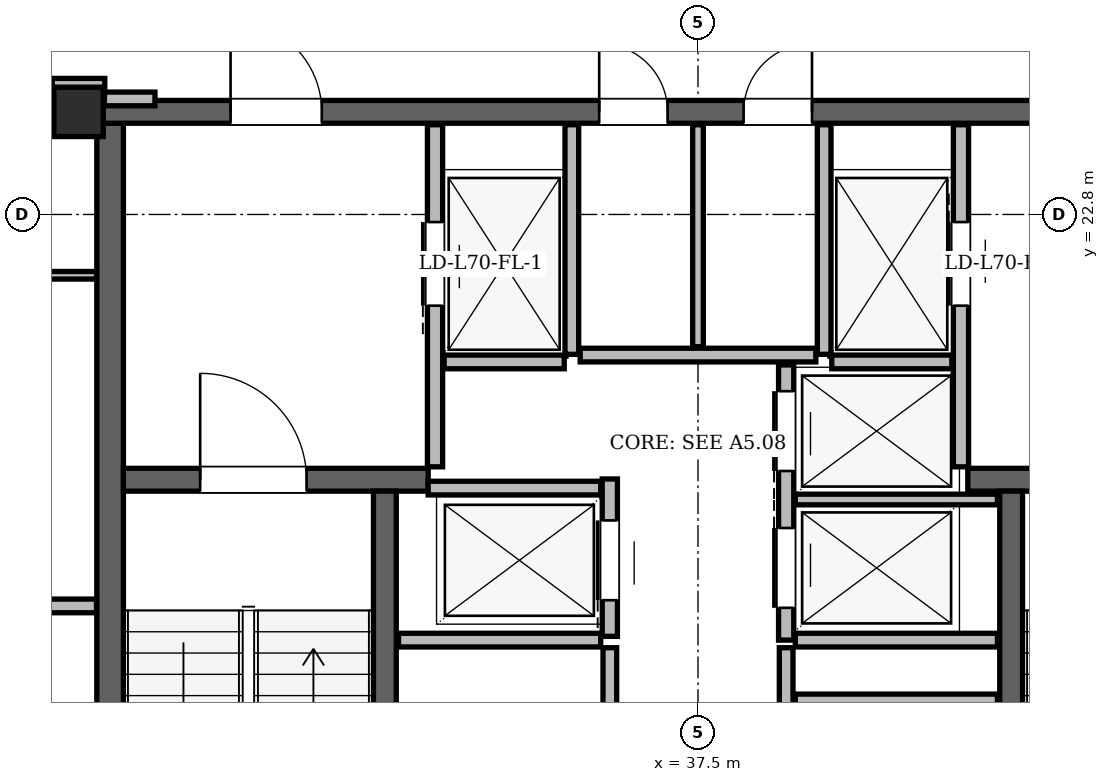
"""IFC4 building model, lengths in metres.
Left out: names, types, materials, properties, quantities, classifications, styles, units other than length and angle.
Written with IfcOpenShell. Run it as: python <this file> out.ifc"""

import sys

from ifc_helpers import new_model, si_unit, direction, frame, frame_2d, origin, origin_2d, place, context, subcontext, project, spatial, rectangle, hollow_rectangle, extrude, element, fill, save


model = new_model("IFC4")
c1 = context("Model", 3, precision=1e-05, world=origin(), true_north=direction((0.0, 1.0)))
c2 = subcontext(c1, "Body", "Model", "MODEL_VIEW")
j1 = project(units=[si_unit("LENGTHUNIT", "METRE"), si_unit("PLANEANGLEUNIT", "RADIAN")], contexts=[c1])
p1 = place(None, origin())
s1 = spatial("IfcSite", under=j1, at=p1, CompositionType="ELEMENT")
p2 = place(p1, origin())
s2 = spatial("IfcBuilding", under=s1, at=p2, CompositionType="ELEMENT")
p3 = place(p2, frame((0.0, 0.0, 265.5)))
s3 = spatial("IfcBuildingStorey", under=s2, at=p3, CompositionType="ELEMENT", Elevation=265.5)
p4 = place(p3, frame((29.35, 24.15, 0.0), z_axis=(0.0, 0.0, 1.0), x_axis=(1.0, 0.0, 0.0)))
e1 = element("IfcColumn", 1, at=p4, inside=s3, PredefinedType="COLUMN", context=c2, shape_type="SweptSolid", body=[
    extrude(hollow_rectangle(XDim=0.65, YDim=0.65, WallThickness=0.05, at=origin_2d()), origin(), (0.0, 0.0, 1.0), 3.9),
])
p5 = place(p3, frame((29.765, 11.0, 0.0), z_axis=(0.0, 0.0, 1.0), x_axis=(0.0, 1.0, 0.0)))
e2 = element("IfcWall", 2, at=p5, inside=s3, PredefinedType="SHEAR", context=c2, shape_type="SweptSolid", body=[
    extrude(rectangle(XDim=13.3, YDim=0.35, at=frame_2d((6.65, 0.0))), origin(), (0.0, 0.0, 1.0), 3.68),
])
p6 = place(p3, frame((29.65, 24.15, 0.0), z_axis=(0.0, 0.0, 1.0), x_axis=(1.0, 0.0, 0.0)))
e3 = element("IfcWall", 3, at=p6, inside=s3, PredefinedType="SHEAR", context=c2, shape_type="SweptSolid", body=[
    extrude(rectangle(XDim=15.7, YDim=0.3, at=frame_2d((7.85, 0.0))), origin(), (0.0, 0.0, 1.0), 3.68),
])
p7 = place(p6, frame((1.7, 0.0, 0.0)))
e4 = element("IfcOpeningElement", 4, at=p7, cuts=e3, PredefinedType="OPENING", context=c2, shape_type="SweptSolid", body=[
    extrude(rectangle(XDim=1.2, YDim=2.2, at=frame_2d((0.6, 1.1))), frame((0.0, 0.15, 0.0), z_axis=(0.0, -1.0, 0.0), x_axis=(1.0, 0.0, 0.0)), (0.0, 0.0, 1.0), 0.3),
])
p8 = place(p6, frame((12.8, 0.0, 0.0)))
e5 = element("IfcOpeningElement", 5, at=p8, cuts=e3, PredefinedType="OPENING", context=c2, shape_type="SweptSolid", body=[
    extrude(rectangle(XDim=1.2, YDim=2.2, at=frame_2d((0.6, 1.1))), frame((0.0, 0.15, 0.0), z_axis=(0.0, -1.0, 0.0), x_axis=(1.0, 0.0, 0.0)), (0.0, 0.0, 1.0), 0.3),
])
p9 = place(p6, frame((6.55, 0.0, 0.0)))
e6 = element("IfcOpeningElement", 6, at=p9, cuts=e3, PredefinedType="OPENING", context=c2, shape_type="SweptSolid", body=[
    extrude(rectangle(XDim=0.9, YDim=2.05, at=frame_2d((0.45, 1.025))), frame((0.0, 0.15, 0.0), z_axis=(0.0, -1.0, 0.0), x_axis=(1.0, 0.0, 0.0)), (0.0, 0.0, 1.0), 0.3),
])
p10 = place(p6, frame((8.45, 0.0, 0.0)))
e7 = element("IfcOpeningElement", 7, at=p10, cuts=e3, PredefinedType="OPENING", context=c2, shape_type="SweptSolid", body=[
    extrude(rectangle(XDim=0.9, YDim=2.05, at=frame_2d((0.45, 1.025))), frame((0.0, 0.15, 0.0), z_axis=(0.0, -1.0, 0.0), x_axis=(1.0, 0.0, 0.0)), (0.0, 0.0, 1.0), 0.3),
])
p11 = place(p3, frame((29.94, 19.31, 0.0), z_axis=(0.0, 0.0, 1.0), x_axis=(1.0, 0.0, 0.0)))
e8 = element("IfcWall", 8, at=p11, inside=s3, PredefinedType="SHEAR", context=c2, shape_type="SweptSolid", body=[
    extrude(rectangle(XDim=4.01, YDim=0.3, at=frame_2d((2.005, 0.0))), origin(), (0.0, 0.0, 1.0), 3.68),
])
p12 = place(p11, frame((1.01, 0.0, 0.0)))
e9 = element("IfcOpeningElement", 9, at=p12, cuts=e8, PredefinedType="OPENING", context=c2, shape_type="SweptSolid", body=[
    extrude(rectangle(XDim=1.4, YDim=2.2, at=frame_2d((0.7, 1.1))), frame((0.0, 0.15, 0.0), z_axis=(0.0, -1.0, 0.0), x_axis=(1.0, 0.0, 0.0)), (0.0, 0.0, 1.0), 0.3),
])
p13 = place(p3, frame((41.05, 19.31, 0.0), z_axis=(0.0, 0.0, 1.0), x_axis=(1.0, 0.0, 0.0)))
e10 = element("IfcWall", 10, at=p13, inside=s3, PredefinedType="SHEAR", context=c2, shape_type="SweptSolid", body=[
    extrude(rectangle(XDim=4.01, YDim=0.3, at=frame_2d((2.005, 0.0))), origin(), (0.0, 0.0, 1.0), 3.68),
])
p14 = place(p13, frame((1.6, 0.0, 0.0)))
e11 = element("IfcOpeningElement", 11, at=p14, cuts=e10, PredefinedType="OPENING", context=c2, shape_type="SweptSolid", body=[
    extrude(rectangle(XDim=1.4, YDim=2.2, at=frame_2d((0.7, 1.1))), frame((0.0, 0.15, 0.0), z_axis=(0.0, -1.0, 0.0), x_axis=(1.0, 0.0, 0.0)), (0.0, 0.0, 1.0), 0.3),
])
for number, where, z_axis, x_axis in (
    (12, (33.38, 11.54, 0.0), (0.0, 0.0, 1.0), (0.0, 1.0, 0.0)),
    (13, (41.62, 11.54, 0.0), (0.0, 0.0, 1.0), (0.0, 1.0, 0.0)),
):
    element("IfcWall", number, at=place(p3, frame(where, z_axis=z_axis, x_axis=x_axis)), inside=s3, PredefinedType="SHEAR", context=c2, shape_type="SweptSolid", body=[
        extrude(rectangle(XDim=7.62, YDim=0.3, at=frame_2d((3.81, 0.0))), origin(), (0.0, 0.0, 1.0), 3.68),
    ])
p15 = place(p3, frame((35.012, 43.042, 0.0), z_axis=(0.0, 0.0, 1.0), x_axis=(-0.49999932964, -0.866025790817, 0.0)))
e14 = element("IfcWall", 14, at=p15, inside=s3, PredefinedType="SOLIDWALL", context=c2, shape_type="SweptSolid", body=[
    extrude(rectangle(XDim=37.248, YDim=0.29, at=frame_2d((18.624, 0.0))), origin(), (0.0, 0.0, 1.0), 3.058),
])
p16 = place(p15, frame((3.639, 0.0, 0.0)))
e15 = element("IfcOpeningElement", 15, at=p16, cuts=e14, PredefinedType="OPENING", context=c2, shape_type="SweptSolid", body=[
    extrude(rectangle(XDim=1.5, YDim=2.2, at=frame_2d((0.75, 1.1))), frame((0.0, 0.145, 0.0), z_axis=(0.0, -1.0, 0.0), x_axis=(1.0, 0.0, 0.0)), (0.0, 0.0, 1.0), 0.29),
])
p17 = place(p15, frame((27.504, 0.0, 0.0)))
e16 = element("IfcOpeningElement", 16, at=p17, cuts=e14, PredefinedType="OPENING", context=c2, shape_type="SweptSolid", body=[
    extrude(rectangle(XDim=1.5, YDim=2.2, at=frame_2d((0.75, 1.1))), frame((0.0, 0.145, 0.0), z_axis=(0.0, -1.0, 0.0), x_axis=(1.0, 0.0, 0.0)), (0.0, 0.0, 1.0), 0.29),
])
p18 = place(p15, frame((35.135, 0.0, 0.85)))
e17 = element("IfcOpeningElement", 17, at=p18, cuts=e14, PredefinedType="OPENING", context=c2, shape_type="SweptSolid", body=[
    extrude(rectangle(XDim=1.2, YDim=1.48, at=frame_2d((0.6, 0.74))), frame((0.0, 0.145, 0.0), z_axis=(0.0, -1.0, 0.0), x_axis=(1.0, 0.0, 0.0)), (0.0, 0.0, 1.0), 0.29),
])
p19 = place(p15, frame((32.321, 0.0, 0.85)))
e18 = element("IfcOpeningElement", 18, at=p19, cuts=e14, PredefinedType="OPENING", context=c2, shape_type="SweptSolid", body=[
    extrude(rectangle(XDim=2.0, YDim=1.8, at=frame_2d((1.0, 0.9))), frame((0.0, 0.145, 0.0), z_axis=(0.0, -1.0, 0.0), x_axis=(1.0, 0.0, 0.0)), (0.0, 0.0, 1.0), 0.29),
])
p20 = place(p15, frame((12.691, 0.0, 0.85)))
e19 = element("IfcOpeningElement", 19, at=p20, cuts=e14, PredefinedType="OPENING", context=c2, shape_type="SweptSolid", body=[
    extrude(rectangle(XDim=2.0, YDim=1.8, at=frame_2d((1.0, 0.9))), frame((0.0, 0.145, 0.0), z_axis=(0.0, -1.0, 0.0), x_axis=(1.0, 0.0, 0.0)), (0.0, 0.0, 1.0), 0.29),
])
p21 = place(p15, frame((21.019, 0.0, 0.85)))
e20 = element("IfcOpeningElement", 20, at=p21, cuts=e14, PredefinedType="OPENING", context=c2, shape_type="SweptSolid", body=[
    extrude(rectangle(XDim=1.4, YDim=1.6, at=frame_2d((0.7, 0.8))), frame((0.0, 0.145, 0.0), z_axis=(0.0, -1.0, 0.0), x_axis=(1.0, 0.0, 0.0)), (0.0, 0.0, 1.0), 0.29),
])
p22 = place(p15, frame((1.529, 0.0, 0.85)))
e21 = element("IfcOpeningElement", 21, at=p22, cuts=e14, PredefinedType="OPENING", context=c2, shape_type="SweptSolid", body=[
    extrude(rectangle(XDim=1.2, YDim=1.48, at=frame_2d((0.6, 0.74))), frame((0.0, 0.145, 0.0), z_axis=(0.0, -1.0, 0.0), x_axis=(1.0, 0.0, 0.0)), (0.0, 0.0, 1.0), 0.29),
])
p23 = place(p15, frame((7.904, 0.0, 0.85)))
e22 = element("IfcOpeningElement", 22, at=p23, cuts=e14, PredefinedType="OPENING", context=c2, shape_type="SweptSolid", body=[
    extrude(rectangle(XDim=2.0, YDim=1.8, at=frame_2d((1.0, 0.9))), frame((0.0, 0.145, 0.0), z_axis=(0.0, -1.0, 0.0), x_axis=(1.0, 0.0, 0.0)), (0.0, 0.0, 1.0), 0.29),
])
p24 = place(p3, frame((34.04, 19.48, 0.0), z_axis=(0.0, 0.0, 1.0), x_axis=(0.0, 1.0, 0.0)))
e23 = element("IfcWall", 23, at=p24, inside=s3, PredefinedType="PARTITIONING", context=c2, shape_type="SweptSolid", body=[
    extrude(rectangle(XDim=4.5, YDim=0.2, at=frame_2d((2.25, 0.0))), origin(), (0.0, 0.0, 1.0), 3.68),
])
p25 = place(p24, frame((2.12, 0.0, 0.0)))
e24 = element("IfcOpeningElement", 24, at=p25, cuts=e23, PredefinedType="OPENING", context=c2, shape_type="SweptSolid", body=[
    extrude(rectangle(XDim=1.1, YDim=2.2, at=frame_2d((0.55, 1.1))), frame((0.0, 0.1, 0.0), z_axis=(0.0, -1.0, 0.0), x_axis=(1.0, 0.0, 0.0)), (0.0, 0.0, 1.0), 0.2),
])
p26 = place(p3, frame((35.84, 20.96, 0.0), z_axis=(0.0, 0.0, 1.0), x_axis=(0.0, 1.0, 0.0)))
e25 = element("IfcWall", 25, at=p26, inside=s3, PredefinedType="PARTITIONING", context=c2, shape_type="SweptSolid", body=[
    extrude(rectangle(XDim=3.02, YDim=0.18, at=frame_2d((1.51, 0.0))), origin(), (0.0, 0.0, 1.0), 3.68),
])
p27 = place(p3, frame((34.16, 20.86, 0.0), z_axis=(0.0, 0.0, 1.0), x_axis=(1.0, 0.0, 0.0)))
e26 = element("IfcWall", 26, at=p27, inside=s3, PredefinedType="PARTITIONING", context=c2, shape_type="SweptSolid", body=[
    extrude(rectangle(XDim=1.58, YDim=0.18, at=frame_2d((0.79, 0.0))), origin(), (0.0, 0.0, 1.0), 3.68),
])
p28 = place(p3, frame((40.96, 19.48, 0.0), z_axis=(0.0, 0.0, 1.0), x_axis=(0.0, 1.0, 0.0)))
e27 = element("IfcWall", 27, at=p28, inside=s3, PredefinedType="PARTITIONING", context=c2, shape_type="SweptSolid", body=[
    extrude(rectangle(XDim=4.5, YDim=0.2, at=frame_2d((2.25, 0.0))), origin(), (0.0, 0.0, 1.0), 3.68),
])
p29 = place(p28, frame((2.12, 0.0, 0.0)))
e28 = element("IfcOpeningElement", 28, at=p29, cuts=e27, PredefinedType="OPENING", context=c2, shape_type="SweptSolid", body=[
    extrude(rectangle(XDim=1.1, YDim=2.2, at=frame_2d((0.55, 1.1))), frame((0.0, 0.1, 0.0), z_axis=(0.0, -1.0, 0.0), x_axis=(1.0, 0.0, 0.0)), (0.0, 0.0, 1.0), 0.2),
])
p30 = place(p3, frame((39.16, 20.96, 0.0), z_axis=(0.0, 0.0, 1.0), x_axis=(0.0, 1.0, 0.0)))
e29 = element("IfcWall", 29, at=p30, inside=s3, PredefinedType="PARTITIONING", context=c2, shape_type="SweptSolid", body=[
    extrude(rectangle(XDim=3.02, YDim=0.18, at=frame_2d((1.51, 0.0))), origin(), (0.0, 0.0, 1.0), 3.68),
])
p31 = place(p3, frame((39.26, 20.86, 0.0), z_axis=(0.0, 0.0, 1.0), x_axis=(1.0, 0.0, 0.0)))
e30 = element("IfcWall", 30, at=p31, inside=s3, PredefinedType="PARTITIONING", context=c2, shape_type="SweptSolid", body=[
    extrude(rectangle(XDim=1.58, YDim=0.18, at=frame_2d((0.79, 0.0))), origin(), (0.0, 0.0, 1.0), 3.68),
])
p32 = place(p3, frame((36.34, 17.25, 0.0), z_axis=(0.0, 0.0, 1.0), x_axis=(0.0, 1.0, 0.0)))
e31 = element("IfcWall", 31, at=p32, inside=s3, PredefinedType="PARTITIONING", context=c2, shape_type="SweptSolid", body=[
    extrude(rectangle(XDim=2.07, YDim=0.2, at=frame_2d((1.035, 0.0))), origin(), (0.0, 0.0, 1.0), 3.68),
])
p33 = place(p32, frame((0.475, 0.0, 0.0)))
e32 = element("IfcOpeningElement", 32, at=p33, cuts=e31, PredefinedType="OPENING", context=c2, shape_type="SweptSolid", body=[
    extrude(rectangle(XDim=1.05, YDim=2.15, at=frame_2d((0.525, 1.075))), frame((0.0, 0.1, 0.0), z_axis=(0.0, -1.0, 0.0), x_axis=(1.0, 0.0, 0.0)), (0.0, 0.0, 1.0), 0.2),
])
p34 = place(p3, frame((33.95, 19.2, 0.0), z_axis=(0.0, 0.0, 1.0), x_axis=(1.0, 0.0, 0.0)))
e33 = element("IfcWall", 33, at=p34, inside=s3, PredefinedType="PARTITIONING", context=c2, shape_type="SweptSolid", body=[
    extrude(rectangle(XDim=2.27, YDim=0.18, at=frame_2d((1.135, 0.0))), origin(), (0.0, 0.0, 1.0), 3.68),
])
p35 = place(p3, frame((33.56, 17.2, 0.0), z_axis=(0.0, 0.0, 1.0), x_axis=(1.0, 0.0, 0.0)))
e34 = element("IfcWall", 34, at=p35, inside=s3, PredefinedType="PARTITIONING", context=c2, shape_type="SweptSolid", body=[
    extrude(rectangle(XDim=2.66, YDim=0.18, at=frame_2d((1.33, 0.0))), origin(), (0.0, 0.0, 1.0), 3.68),
])
p36 = place(p3, frame((36.34, 11.55, 0.0), z_axis=(0.0, 0.0, 1.0), x_axis=(0.0, 1.0, 0.0)))
e35 = element("IfcWall", 35, at=p36, inside=s3, PredefinedType="PARTITIONING", context=c2, shape_type="SweptSolid", body=[
    extrude(rectangle(XDim=5.55, YDim=0.18, at=frame_2d((2.775, 0.0))), origin(), (0.0, 0.0, 1.0), 3.68),
])
p37 = place(p36, frame((2.85, 0.0, 0.0)))
e36 = element("IfcOpeningElement", 36, at=p37, cuts=e35, PredefinedType="OPENING", context=c2, shape_type="SweptSolid", body=[
    extrude(rectangle(XDim=0.95, YDim=2.1, at=frame_2d((0.475, 1.05))), frame((0.0, 0.09, 0.0), z_axis=(0.0, -1.0, 0.0), x_axis=(1.0, 0.0, 0.0)), (0.0, 0.0, 1.0), 0.18),
])
p38 = place(p3, frame((38.66, 17.2, 0.0), z_axis=(0.0, 0.0, 1.0), x_axis=(0.0, 1.0, 0.0)))
e37 = element("IfcWall", 37, at=p38, inside=s3, PredefinedType="PARTITIONING", context=c2, shape_type="SweptSolid", body=[
    extrude(rectangle(XDim=3.62, YDim=0.2, at=frame_2d((1.81, 0.0))), origin(), (0.0, 0.0, 1.0), 3.68),
])
p39 = place(p38, frame((0.425, 0.0, 0.0)))
e38 = element("IfcOpeningElement", 38, at=p39, cuts=e37, PredefinedType="OPENING", context=c2, shape_type="SweptSolid", body=[
    extrude(rectangle(XDim=1.05, YDim=2.15, at=frame_2d((0.525, 1.075))), frame((0.0, 0.1, 0.0), z_axis=(0.0, -1.0, 0.0), x_axis=(1.0, 0.0, 0.0)), (0.0, 0.0, 1.0), 0.2),
])
p40 = place(p38, frame((2.225, 0.0, 0.0)))
e39 = element("IfcOpeningElement", 39, at=p40, cuts=e37, PredefinedType="OPENING", context=c2, shape_type="SweptSolid", body=[
    extrude(rectangle(XDim=1.05, YDim=2.15, at=frame_2d((0.525, 1.075))), frame((0.0, 0.1, 0.0), z_axis=(0.0, -1.0, 0.0), x_axis=(1.0, 0.0, 0.0)), (0.0, 0.0, 1.0), 0.2),
])
p41 = place(p3, frame((38.78, 17.2, 0.0), z_axis=(0.0, 0.0, 1.0), x_axis=(1.0, 0.0, 0.0)))
e40 = element("IfcWall", 40, at=p41, inside=s3, PredefinedType="PARTITIONING", context=c2, shape_type="SweptSolid", body=[
    extrude(rectangle(XDim=2.66, YDim=0.18, at=frame_2d((1.33, 0.0))), origin(), (0.0, 0.0, 1.0), 3.68),
])
p42 = place(p3, frame((38.78, 19.05, 0.0), z_axis=(0.0, 0.0, 1.0), x_axis=(1.0, 0.0, 0.0)))
e41 = element("IfcWall", 41, at=p42, inside=s3, PredefinedType="PARTITIONING", context=c2, shape_type="SweptSolid", body=[
    extrude(rectangle(XDim=2.66, YDim=0.14, at=frame_2d((1.33, 0.0))), origin(), (0.0, 0.0, 1.0), 3.68),
])
p43 = place(p3, frame((38.66, 11.55, 0.0), z_axis=(0.0, 0.0, 1.0), x_axis=(0.0, 1.0, 0.0)))
e42 = element("IfcWall", 42, at=p43, inside=s3, PredefinedType="PARTITIONING", context=c2, shape_type="SweptSolid", body=[
    extrude(rectangle(XDim=5.55, YDim=0.18, at=frame_2d((2.775, 0.0))), origin(), (0.0, 0.0, 1.0), 3.68),
])
p44 = place(p43, frame((2.0, 0.0, 0.0)))
e43 = element("IfcOpeningElement", 43, at=p44, cuts=e42, PredefinedType="OPENING", context=c2, shape_type="SweptSolid", body=[
    extrude(rectangle(XDim=0.95, YDim=2.1, at=frame_2d((0.475, 1.05))), frame((0.0, 0.09, 0.0), z_axis=(0.0, -1.0, 0.0), x_axis=(1.0, 0.0, 0.0)), (0.0, 0.0, 1.0), 0.18),
])
p45 = place(p3, frame((38.78, 16.42, 0.0), z_axis=(0.0, 0.0, 1.0), x_axis=(1.0, 0.0, 0.0)))
e44 = element("IfcWall", 44, at=p45, inside=s3, PredefinedType="PARTITIONING", context=c2, shape_type="SweptSolid", body=[
    extrude(rectangle(XDim=2.66, YDim=0.14, at=frame_2d((1.33, 0.0))), origin(), (0.0, 0.0, 1.0), 3.68),
])
p46 = place(p3, frame((35.95, 20.95, 0.0), z_axis=(0.0, 0.0, 1.0), x_axis=(1.0, 0.0, 0.0)))
e45 = element("IfcWall", 45, at=p46, inside=s3, PredefinedType="PARTITIONING", context=c2, shape_type="SweptSolid", body=[
    extrude(rectangle(XDim=3.1, YDim=0.18, at=frame_2d((1.55, 0.0))), origin(), (0.0, 0.0, 1.0), 3.68),
])
p47 = place(p3, frame((37.5, 21.06, 0.0), z_axis=(0.0, 0.0, 1.0), x_axis=(0.0, 1.0, 0.0)))
e46 = element("IfcWall", 46, at=p47, inside=s3, PredefinedType="PARTITIONING", context=c2, shape_type="SweptSolid", body=[
    extrude(rectangle(XDim=2.92, YDim=0.14, at=frame_2d((1.46, 0.0))), origin(), (0.0, 0.0, 1.0), 3.68),
])
p48 = place(p3, frame((20.525, 17.65, 0.0), z_axis=(0.0, 0.0, 1.0), x_axis=(1.0, 0.0, 0.0)))
e47 = element("IfcWall", 47, at=p48, inside=s3, PredefinedType="PARTITIONING", context=c2, shape_type="SweptSolid", body=[
    extrude(rectangle(XDim=9.061, YDim=0.18, at=frame_2d((4.531, 0.0))), origin(), (0.0, 0.0, 1.0), 2.82),
])
p49 = place(p3, frame((23.036, 22.0, 0.0), z_axis=(0.0, 0.0, 1.0), x_axis=(1.0, 0.0, 0.0)))
e48 = element("IfcWall", 48, at=p49, inside=s3, PredefinedType="PARTITIONING", context=c2, shape_type="SweptSolid", body=[
    extrude(rectangle(XDim=6.55, YDim=0.1, at=frame_2d((3.275, 0.0))), origin(), (0.0, 0.0, 1.0), 2.82),
])
p50 = place(p49, frame((0.491, 0.0, 0.0)))
e49 = element("IfcOpeningElement", 49, at=p50, cuts=e48, PredefinedType="OPENING", context=c2, shape_type="SweptSolid", body=[
    extrude(rectangle(XDim=0.88, YDim=2.08, at=frame_2d((0.44, 1.04))), frame((0.0, 0.05, 0.0), z_axis=(0.0, -1.0, 0.0), x_axis=(1.0, 0.0, 0.0)), (0.0, 0.0, 1.0), 0.1),
])
p51 = place(p49, frame((2.441, 0.0, 0.0)))
e50 = element("IfcOpeningElement", 50, at=p51, cuts=e48, PredefinedType="OPENING", context=c2, shape_type="SweptSolid", body=[
    extrude(rectangle(XDim=0.95, YDim=2.1, at=frame_2d((0.475, 1.05))), frame((0.0, 0.05, 0.0), z_axis=(0.0, -1.0, 0.0), x_axis=(1.0, 0.0, 0.0)), (0.0, 0.0, 1.0), 0.1),
])
p52 = place(p49, frame((4.798, 0.0, 0.0)))
e51 = element("IfcOpeningElement", 51, at=p52, cuts=e48, PredefinedType="OPENING", context=c2, shape_type="SweptSolid", body=[
    extrude(rectangle(XDim=0.92, YDim=2.12, at=frame_2d((0.46, 1.06))), frame((0.0, 0.05, 0.0), z_axis=(0.0, -1.0, 0.0), x_axis=(1.0, 0.0, 0.0)), (0.0, 0.0, 1.0), 0.1),
])
p53 = place(p3, frame((25.6, 24.32, 0.0), z_axis=(0.0, 0.0, 1.0), x_axis=(1.0, 0.0, 0.0)))
e52 = element("IfcWall", 52, at=p53, inside=s3, PredefinedType="PARTITIONING", context=c2, shape_type="SweptSolid", body=[
    extrude(rectangle(XDim=3.41, YDim=0.18, at=frame_2d((1.705, 0.0))), origin(), (0.0, 0.0, 1.0), 3.68),
])
p54 = place(p3, frame((29.69, 24.32, 0.0), z_axis=(0.0, 0.0, 1.0), x_axis=(1.0, 0.0, 0.0)))
e53 = element("IfcWall", 53, at=p54, inside=s3, PredefinedType="PARTITIONING", context=c2, shape_type="SweptSolid", body=[
    extrude(rectangle(XDim=0.665, YDim=0.18, at=frame_2d((0.333, 0.0))), origin(), (0.0, 0.0, 1.0), 2.82),
])
p55 = place(p3, frame((29.005, 24.5, 0.0), z_axis=(0.0, 0.0, 1.0), x_axis=(1.0, 0.0, 0.0)))
e54 = element("IfcWall", 54, at=p55, inside=s3, PredefinedType="PARTITIONING", context=c2, shape_type="SweptSolid", body=[
    extrude(rectangle(XDim=0.69, YDim=0.18, at=frame_2d((0.345, 0.0))), origin(), (0.0, 0.0, 1.0), 3.266),
])
p56 = place(p25, origin())
e55 = element("IfcDoor", 55, at=p56, inside=s3, OperationType="SLIDING_TO_LEFT", PredefinedType="DOOR", context=c2, shape_type="SweptSolid", body=[
    extrude(rectangle(XDim=1.1, YDim=2.2, at=frame_2d((0.55, 1.1))), frame((0.0, 0.025, 0.0), z_axis=(0.0, -1.0, 0.0), x_axis=(1.0, 0.0, 0.0)), (0.0, 0.0, 1.0), 0.05),
])
fill(e24, e55)
p57 = place(p29, origin())
e56 = element("IfcDoor", 56, at=p57, inside=s3, OperationType="SLIDING_TO_RIGHT", PredefinedType="DOOR", context=c2, shape_type="SweptSolid", body=[
    extrude(rectangle(XDim=1.1, YDim=2.2, at=frame_2d((0.55, 1.1))), frame((0.0, 0.025, 0.0), z_axis=(0.0, -1.0, 0.0), x_axis=(1.0, 0.0, 0.0)), (0.0, 0.0, 1.0), 0.05),
])
fill(e28, e56)
p58 = place(p33, origin())
e57 = element("IfcDoor", 57, at=p58, inside=s3, OperationType="SLIDING_TO_LEFT", PredefinedType="DOOR", context=c2, shape_type="SweptSolid", body=[
    extrude(rectangle(XDim=1.05, YDim=2.15, at=frame_2d((0.525, 1.075))), frame((0.0, 0.025, 0.0), z_axis=(0.0, -1.0, 0.0), x_axis=(1.0, 0.0, 0.0)), (0.0, 0.0, 1.0), 0.05),
])
fill(e32, e57)
p59 = place(p39, origin())
e58 = element("IfcDoor", 58, at=p59, inside=s3, OperationType="SLIDING_TO_RIGHT", PredefinedType="DOOR", context=c2, shape_type="SweptSolid", body=[
    extrude(rectangle(XDim=1.05, YDim=2.15, at=frame_2d((0.525, 1.075))), frame((0.0, 0.025, 0.0), z_axis=(0.0, -1.0, 0.0), x_axis=(1.0, 0.0, 0.0)), (0.0, 0.0, 1.0), 0.05),
])
fill(e38, e58)
p60 = place(p40, origin())
e59 = element("IfcDoor", 59, at=p60, inside=s3, OperationType="SLIDING_TO_LEFT", PredefinedType="DOOR", context=c2, shape_type="SweptSolid", body=[
    extrude(rectangle(XDim=1.05, YDim=2.15, at=frame_2d((0.525, 1.075))), frame((0.0, 0.025, 0.0), z_axis=(0.0, -1.0, 0.0), x_axis=(1.0, 0.0, 0.0)), (0.0, 0.0, 1.0), 0.05),
])
fill(e39, e59)
p61 = place(p12, origin())
e60 = element("IfcDoor", 60, at=p61, inside=s3, OperationType="SINGLE_SWING_LEFT", PredefinedType="DOOR", context=c2, shape_type="SweptSolid", body=[
    extrude(rectangle(XDim=1.4, YDim=2.2, at=frame_2d((0.7, 1.1))), frame((0.0, 0.025, 0.0), z_axis=(0.0, -1.0, 0.0), x_axis=(1.0, 0.0, 0.0)), (0.0, 0.0, 1.0), 0.05),
])
fill(e9, e60)
p62 = place(p7, origin())
e61 = element("IfcDoor", 61, at=p62, inside=s3, OperationType="SINGLE_SWING_LEFT", PredefinedType="DOOR", context=c2, shape_type="SweptSolid", body=[
    extrude(rectangle(XDim=1.2, YDim=2.2, at=frame_2d((0.6, 1.1))), frame((0.0, 0.025, 0.0), z_axis=(0.0, -1.0, 0.0), x_axis=(1.0, 0.0, 0.0)), (0.0, 0.0, 1.0), 0.05),
])
fill(e4, e61)
p63 = place(p9, origin())
e62 = element("IfcDoor", 62, at=p63, inside=s3, OperationType="SINGLE_SWING_LEFT", PredefinedType="DOOR", context=c2, shape_type="SweptSolid", body=[
    extrude(rectangle(XDim=0.9, YDim=2.05, at=frame_2d((0.45, 1.025))), frame((0.0, 0.025, 0.0), z_axis=(0.0, -1.0, 0.0), x_axis=(1.0, 0.0, 0.0)), (0.0, 0.0, 1.0), 0.05),
])
fill(e6, e62)
p64 = place(p10, origin())
e63 = element("IfcDoor", 63, at=p64, inside=s3, OperationType="SINGLE_SWING_RIGHT", PredefinedType="DOOR", context=c2, shape_type="SweptSolid", body=[
    extrude(rectangle(XDim=0.9, YDim=2.05, at=frame_2d((0.45, 1.025))), frame((0.0, 0.025, 0.0), z_axis=(0.0, -1.0, 0.0), x_axis=(1.0, 0.0, 0.0)), (0.0, 0.0, 1.0), 0.05),
])
fill(e7, e63)
save(model, sys.argv[1])
